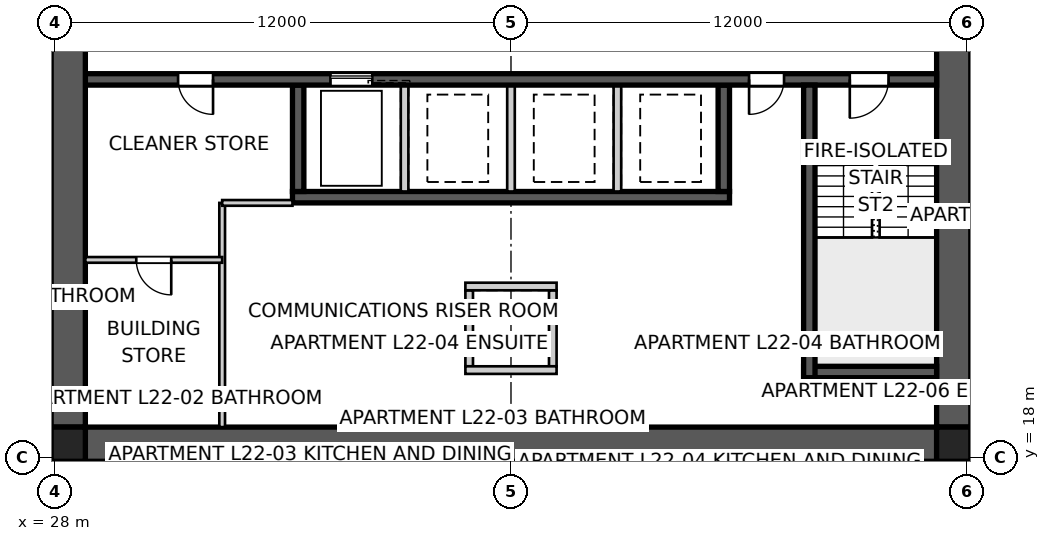
"""IFC4 building model, lengths in metres.
Left out: names, types, materials, properties, quantities, classifications, styles, units other than length and angle.
Written with IfcOpenShell. Run it as: python <this file> out.ifc"""

import sys

from ifc_helpers import new_model, si_unit, direction, frame, frame_2d, origin, origin_2d, place, context, subcontext, project, spatial, polyline, rectangle, outline, extrude, element, fill, save


model = new_model("IFC4")
c1 = context("Model", 3, precision=1e-05, world=origin(), true_north=direction((0.0, 1.0)))
c2 = subcontext(c1, "Body", "Model", "MODEL_VIEW")
j1 = project(units=[si_unit("LENGTHUNIT", "METRE"), si_unit("PLANEANGLEUNIT", "RADIAN")], contexts=[c1])
p1 = place(None, origin())
s1 = spatial("IfcSite", under=j1, at=p1, CompositionType="ELEMENT")
p2 = place(p1, origin())
s2 = spatial("IfcBuilding", under=s1, at=p2, CompositionType="ELEMENT")
p3 = place(p2, frame((0.0, 0.0, 82.8)))
s3 = spatial("IfcBuildingStorey", under=s2, at=p3, CompositionType="ELEMENT", Elevation=82.8)
p4 = place(p3, frame((51.2, 18.35, 0.0), z_axis=(0.0, 0.0, 1.0), x_axis=(-1.0, 0.0, 0.0)))
e1 = element("IfcWall", 1, at=p4, inside=s3, PredefinedType="SHEAR", context=c2, shape_type="SweptSolid", body=[
    extrude(outline(polyline([(0.0, -0.45), (22.4, -0.45), (22.4, -0.025), (22.85, -0.025), (22.85, 0.025), (22.4, 0.025), (22.4, 0.45), (0.0, 0.45), (0.0, 0.025), (-0.45, 0.025), (-0.45, -0.025), (0.0, -0.025), (0.0, -0.45)])), origin(), (0.0, 0.0, 1.0), 3.4),
])
p5 = place(p3, frame((51.65, 18.8, 0.0), z_axis=(0.0, 0.0, 1.0), x_axis=(0.0, 1.0, 0.0)))
e2 = element("IfcWall", 2, at=p5, inside=s3, PredefinedType="SHEAR", context=c2, shape_type="SweptSolid", body=[
    extrude(outline(polyline([(0.0, -0.45), (22.4, -0.45), (22.4, -0.025), (22.85, -0.025), (22.85, 0.025), (22.4, 0.025), (22.4, 0.45), (0.0, 0.45), (0.0, 0.025), (-0.45, 0.025), (-0.45, -0.025), (0.0, -0.025), (0.0, -0.45)])), origin(), (0.0, 0.0, 1.0), 3.4),
])
p6 = place(p5, frame((11.14, 0.0, 0.0)))
e3 = element("IfcOpeningElement", 3, at=p6, cuts=e2, PredefinedType="OPENING", context=c2, shape_type="SweptSolid", body=[
    extrude(rectangle(XDim=1.02, YDim=2.4, at=frame_2d((0.51, 1.2))), frame((0.0, 0.46, 0.0), z_axis=(0.0, -1.0, 0.0), x_axis=(1.0, 0.0, 0.0)), (0.0, 0.0, 1.0), 0.92),
])
p7 = place(p3, frame((28.35, 41.2, 0.0), z_axis=(0.0, 0.0, 1.0), x_axis=(0.0, -1.0, 0.0)))
e4 = element("IfcWall", 4, at=p7, inside=s3, PredefinedType="SHEAR", context=c2, shape_type="SweptSolid", body=[
    extrude(outline(polyline([(0.0, -0.45), (22.4, -0.45), (22.4, -0.025), (22.85, -0.025), (22.85, 0.025), (22.4, 0.025), (22.4, 0.45), (0.0, 0.45), (0.0, 0.025), (-0.45, 0.025), (-0.45, -0.025), (0.0, -0.025), (0.0, -0.45)])), origin(), (0.0, 0.0, 1.0), 3.4),
])
p8 = place(p7, frame((11.14, 0.0, 0.0)))
e5 = element("IfcOpeningElement", 5, at=p8, cuts=e4, PredefinedType="OPENING", context=c2, shape_type="SweptSolid", body=[
    extrude(rectangle(XDim=1.02, YDim=2.4, at=frame_2d((0.51, 1.2))), frame((0.0, 0.46, 0.0), z_axis=(0.0, -1.0, 0.0), x_axis=(1.0, 0.0, 0.0)), (0.0, 0.0, 1.0), 0.92),
])
p9 = place(p3, frame((51.2, 27.95, 0.0), z_axis=(0.0, 0.0, 1.0), x_axis=(-1.0, 0.0, 0.0)))
e6 = element("IfcWall", 6, at=p9, inside=s3, PredefinedType="SHEAR", context=c2, shape_type="SweptSolid", body=[
    extrude(rectangle(XDim=22.4, YDim=0.3, at=frame_2d((11.2, 0.0))), origin(), (0.0, 0.0, 1.0), 3.4),
])
p10 = place(p9, frame((19.04, 0.0, 0.0)))
e7 = element("IfcOpeningElement", 7, at=p10, cuts=e6, PredefinedType="OPENING", context=c2, shape_type="SweptSolid", body=[
    extrude(rectangle(XDim=0.92, YDim=2.1, at=frame_2d((0.46, 1.05))), frame((0.0, 0.16, 0.0), z_axis=(0.0, -1.0, 0.0), x_axis=(1.0, 0.0, 0.0)), (0.0, 0.0, 1.0), 0.32),
])
p11 = place(p9, frame((1.265, 0.0, 0.0)))
e8 = element("IfcOpeningElement", 8, at=p11, cuts=e6, PredefinedType="OPENING", context=c2, shape_type="SweptSolid", body=[
    extrude(rectangle(XDim=1.02, YDim=2.1, at=frame_2d((0.51, 1.05))), frame((0.0, 0.16, 0.0), z_axis=(0.0, -1.0, 0.0), x_axis=(1.0, 0.0, 0.0)), (0.0, 0.0, 1.0), 0.32),
])
p12 = place(p9, frame((4.015, 0.0, 0.0)))
e9 = element("IfcOpeningElement", 9, at=p12, cuts=e6, PredefinedType="OPENING", context=c2, shape_type="SweptSolid", body=[
    extrude(rectangle(XDim=0.92, YDim=2.1, at=frame_2d((0.46, 1.05))), frame((0.0, 0.16, 0.0), z_axis=(0.0, -1.0, 0.0), x_axis=(1.0, 0.0, 0.0)), (0.0, 0.0, 1.0), 0.32),
])
p13 = place(p9, frame((14.85, 0.0, 0.0)))
e10 = element("IfcOpeningElement", 10, at=p13, cuts=e6, PredefinedType="OPENING", context=c2, shape_type="SweptSolid", body=[
    extrude(rectangle(XDim=1.1, YDim=2.1, at=frame_2d((0.55, 1.05))), frame((0.0, 0.16, 0.0), z_axis=(0.0, -1.0, 0.0), x_axis=(1.0, 0.0, 0.0)), (0.0, 0.0, 1.0), 0.32),
])
p14 = place(p3, frame((45.75, 24.85, 0.0), z_axis=(0.0, 0.0, 1.0), x_axis=(-1.0, 0.0, 0.0)))
e11 = element("IfcWall", 11, at=p14, inside=s3, PredefinedType="SHEAR", context=c2, shape_type="SweptSolid", body=[
    extrude(rectangle(XDim=11.5, YDim=0.3, at=frame_2d((5.75, 0.0))), origin(), (0.0, 0.0, 1.0), 3.4),
])
p15 = place(p3, frame((45.6, 27.8, 0.0), z_axis=(0.0, 0.0, 1.0), x_axis=(0.0, -1.0, 0.0)))
e12 = element("IfcWall", 12, at=p15, inside=s3, PredefinedType="SHEAR", context=c2, shape_type="SweptSolid", body=[
    extrude(rectangle(XDim=2.8, YDim=0.3, at=frame_2d((1.4, 0.0))), origin(), (0.0, 0.0, 1.0), 3.4),
])
for number, where, z_axis, x_axis in (
    (13, (42.8, 27.8, 0.0), (0.0, 0.0, 1.0), (0.0, -1.0, 0.0)),
    (14, (40.0, 27.8, 0.0), (0.0, 0.0, 1.0), (0.0, -1.0, 0.0)),
    (15, (37.2, 27.8, 0.0), (0.0, 0.0, 1.0), (0.0, -1.0, 0.0)),
):
    element("IfcWall", number, at=place(p3, frame(where, z_axis=z_axis, x_axis=x_axis)), inside=s3, PredefinedType="SOLIDWALL", context=c2, shape_type="SweptSolid", body=[
        extrude(rectangle(XDim=2.8, YDim=0.2, at=frame_2d((1.4, 0.0))), origin(), (0.0, 0.0, 1.0), 3.4),
    ])
p16 = place(p3, frame((34.4, 27.8, 0.0), z_axis=(0.0, 0.0, 1.0), x_axis=(0.0, -1.0, 0.0)))
e16 = element("IfcWall", 16, at=p16, inside=s3, PredefinedType="SHEAR", context=c2, shape_type="SweptSolid", body=[
    extrude(rectangle(XDim=2.8, YDim=0.3, at=frame_2d((1.4, 0.0))), origin(), (0.0, 0.0, 1.0), 3.4),
])
p17 = place(p3, frame((47.85, 27.8, 0.0), z_axis=(0.0, 0.0, 1.0), x_axis=(0.0, -1.0, 0.0)))
e17 = element("IfcWall", 17, at=p17, inside=s3, PredefinedType="SHEAR", context=c2, shape_type="SweptSolid", body=[
    extrude(rectangle(XDim=7.7, YDim=0.3, at=frame_2d((3.85, 0.0))), origin(), (0.0, 0.0, 1.0), 3.4),
])
p18 = place(p3, frame((51.2, 20.25, 0.0), z_axis=(0.0, 0.0, 1.0), x_axis=(-1.0, 0.0, 0.0)))
e18 = element("IfcWall", 18, at=p18, inside=s3, PredefinedType="SHEAR", context=c2, shape_type="SweptSolid", body=[
    extrude(rectangle(XDim=3.5, YDim=0.3, at=frame_2d((1.75, 0.0))), origin(), (0.0, 0.0, 1.0), 3.4),
])
for number, where, z_axis, x_axis in (
    (19, (38.9, 22.4, 0.0), (0.0, 0.0, 1.0), (0.0, -1.0, 0.0)),
    (20, (41.1, 22.4, 0.0), (0.0, 0.0, 1.0), (0.0, -1.0, 0.0)),
):
    element("IfcWall", number, at=place(p3, frame(where, z_axis=z_axis, x_axis=x_axis)), inside=s3, PredefinedType="SOLIDWALL", context=c2, shape_type="SweptSolid", body=[
        extrude(rectangle(XDim=2.0, YDim=0.2, at=frame_2d((1.0, 0.0))), origin(), (0.0, 0.0, 1.0), 3.4),
    ])
for number, where, z_axis, x_axis in (
    (21, (38.8, 22.5, 0.0), (0.0, 0.0, 1.0), (1.0, 0.0, 0.0)),
    (22, (38.8, 20.3, 0.0), (0.0, 0.0, 1.0), (1.0, 0.0, 0.0)),
):
    element("IfcWall", number, at=place(p3, frame(where, z_axis=z_axis, x_axis=x_axis)), inside=s3, PredefinedType="SOLIDWALL", context=c2, shape_type="SweptSolid", body=[
        extrude(rectangle(XDim=2.4, YDim=0.2, at=frame_2d((1.2, 0.0))), origin(), (0.0, 0.0, 1.0), 3.4),
    ])
for number, where, z_axis, x_axis in (
    (23, (28.35, 18.35, 0.0), (0.0, 0.0, 1.0), (1.0, 0.0, 0.0)),
    (24, (51.65, 18.35, 0.0), (0.0, 0.0, 1.0), (1.0, 0.0, 0.0)),
):
    element("IfcColumn", number, at=place(p3, frame(where, z_axis=z_axis, x_axis=x_axis)), inside=s3, PredefinedType="COLUMN", context=c2, shape_type="SweptSolid", body=[
        extrude(rectangle(XDim=0.9, YDim=0.9, at=origin_2d()), origin(), (0.0, 0.0, 1.0), 3.4),
    ])
p19 = place(p3, frame((32.4, 18.8, 0.0), z_axis=(0.0, 0.0, 1.0), x_axis=(0.0, 1.0, 0.0)))
e25 = element("IfcWall", 25, at=p19, inside=s3, PredefinedType="SOLIDWALL", context=c2, shape_type="SweptSolid", body=[
    extrude(rectangle(XDim=5.9, YDim=0.15, at=frame_2d((2.95, 0.0))), origin(), (0.0, 0.0, 1.0), 3.25),
])
p20 = place(p3, frame((32.4, 24.7, 0.0), z_axis=(0.0, 0.0, 1.0), x_axis=(1.0, 0.0, 0.0)))
e26 = element("IfcWall", 26, at=p20, inside=s3, PredefinedType="SOLIDWALL", context=c2, shape_type="SweptSolid", body=[
    extrude(rectangle(XDim=1.85, YDim=0.15, at=frame_2d((0.925, 0.0))), origin(), (0.0, 0.0, 1.0), 3.25),
])
p21 = place(p3, frame((32.4, 23.2, 0.0), z_axis=(0.0, 0.0, 1.0), x_axis=(-1.0, 0.0, 0.0)))
e27 = element("IfcWall", 27, at=p21, inside=s3, PredefinedType="SOLIDWALL", context=c2, shape_type="SweptSolid", body=[
    extrude(rectangle(XDim=3.6, YDim=0.15, at=frame_2d((1.8, 0.0))), origin(), (0.0, 0.0, 1.0), 3.25),
])
p22 = place(p21, frame((1.34, 0.0, 0.0)))
e28 = element("IfcOpeningElement", 28, at=p22, cuts=e27, PredefinedType="OPENING", context=c2, shape_type="SweptSolid", body=[
    extrude(rectangle(XDim=0.92, YDim=2.1, at=frame_2d((0.46, 1.05))), frame((0.0, 0.085, 0.0), z_axis=(0.0, -1.0, 0.0), x_axis=(1.0, 0.0, 0.0)), (0.0, 0.0, 1.0), 0.17),
])
p23 = place(p10, origin())
e29 = element("IfcDoor", 29, at=p23, inside=s3, OperationType="SINGLE_SWING_LEFT", PredefinedType="DOOR", context=c2, shape_type="SweptSolid", body=[
    extrude(rectangle(XDim=0.92, YDim=2.1, at=frame_2d((0.46, 1.05))), frame((0.0, 0.025, 0.0), z_axis=(0.0, -1.0, 0.0), x_axis=(1.0, 0.0, 0.0)), (0.0, 0.0, 1.0), 0.05),
])
fill(e7, e29)
p24 = place(p11, origin())
e30 = element("IfcDoor", 30, at=p24, inside=s3, OperationType="SINGLE_SWING_RIGHT", PredefinedType="DOOR", context=c2, shape_type="SweptSolid", body=[
    extrude(rectangle(XDim=1.02, YDim=2.1, at=frame_2d((0.51, 1.05))), frame((0.0, 0.025, 0.0), z_axis=(0.0, -1.0, 0.0), x_axis=(1.0, 0.0, 0.0)), (0.0, 0.0, 1.0), 0.05),
])
fill(e8, e30)
p25 = place(p12, origin())
e31 = element("IfcDoor", 31, at=p25, inside=s3, OperationType="SINGLE_SWING_RIGHT", PredefinedType="DOOR", context=c2, shape_type="SweptSolid", body=[
    extrude(rectangle(XDim=0.92, YDim=2.1, at=frame_2d((0.46, 1.05))), frame((0.0, 0.025, 0.0), z_axis=(0.0, -1.0, 0.0), x_axis=(1.0, 0.0, 0.0)), (0.0, 0.0, 1.0), 0.05),
])
fill(e9, e31)
p26 = place(p22, origin())
e32 = element("IfcDoor", 32, at=p26, inside=s3, OperationType="SINGLE_SWING_LEFT", PredefinedType="DOOR", context=c2, shape_type="SweptSolid", body=[
    extrude(rectangle(XDim=0.92, YDim=2.1, at=frame_2d((0.46, 1.05))), frame((0.0, 0.025, 0.0), z_axis=(0.0, -1.0, 0.0), x_axis=(1.0, 0.0, 0.0)), (0.0, 0.0, 1.0), 0.05),
])
fill(e28, e32)
p27 = place(p13, origin())
e33 = element("IfcDoor", 33, at=p27, inside=s3, OperationType="SLIDING_TO_LEFT", PredefinedType="DOOR", context=c2, shape_type="SweptSolid", body=[
    extrude(rectangle(XDim=1.1, YDim=2.1, at=frame_2d((0.55, 1.05))), frame((0.0, 0.025, 0.0), z_axis=(0.0, -1.0, 0.0), x_axis=(1.0, 0.0, 0.0)), (0.0, 0.0, 1.0), 0.05),
])
fill(e10, e33)
save(model, sys.argv[1])
